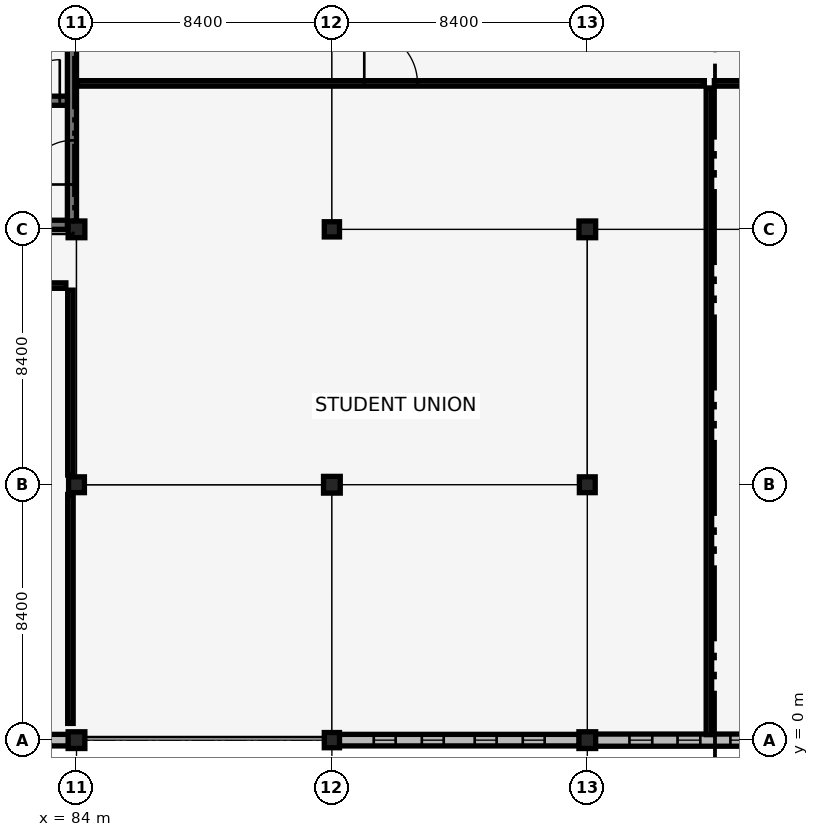
"""IFC4 building model, lengths in metres.
Left out: names, types, materials, properties, quantities, classifications, styles, units other than length and angle.
Written with IfcOpenShell. Run it as: python <this file> out.ifc"""

import sys

from ifc_helpers import new_model, si_unit, direction, frame, frame_2d, origin, origin_2d, place, context, subcontext, project, spatial, rectangle, extrude, element, fill, save


model = new_model("IFC4")
c1 = context("Model", 3, precision=1e-05, world=origin(), true_north=direction((0.0, 1.0)))
c2 = subcontext(c1, "Body", "Model", "MODEL_VIEW")
j1 = project(units=[si_unit("LENGTHUNIT", "METRE"), si_unit("PLANEANGLEUNIT", "RADIAN")], contexts=[c1])
p1 = place(None, origin())
s1 = spatial("IfcSite", under=j1, at=p1, CompositionType="ELEMENT")
p2 = place(p1, origin())
s2 = spatial("IfcBuilding", under=s1, at=p2, CompositionType="ELEMENT")
p3 = place(p2, frame((0.0, 0.0, 5.44)))
s3 = spatial("IfcBuildingStorey", under=s2, at=p3, CompositionType="ELEMENT", Elevation=5.44)
p4 = place(p3, frame((75.75, 16.95, 0.0), z_axis=(0.0, 0.0, 1.0), x_axis=(1.0, 0.0, 0.0)))
e1 = element("IfcWall", 1, at=p4, inside=s3, PredefinedType="SHEAR", context=c2, shape_type="SweptSolid", body=[
    extrude(rectangle(XDim=8.1, YDim=0.3, at=frame_2d((4.05, 0.0))), origin(), (0.0, 0.0, 1.0), 4.12),
])
p5 = place(p4, frame((0.485, 0.0, 0.0)))
e2 = element("IfcOpeningElement", 2, at=p5, cuts=e1, PredefinedType="OPENING", context=c2, shape_type="SweptSolid", body=[
    extrude(rectangle(XDim=1.0, YDim=2.15, at=frame_2d((0.5, 1.075))), frame((0.0, 0.16, 0.0), z_axis=(0.0, -1.0, 0.0), x_axis=(1.0, 0.0, 0.0)), (0.0, 0.0, 1.0), 0.32),
])
p6 = place(p3, frame((83.85, 16.95, 0.0), z_axis=(0.0, 0.0, 1.0), x_axis=(0.0, 1.0, 0.0)))
e3 = element("IfcWall", 3, at=p6, inside=s3, PredefinedType="SHEAR", context=c2, shape_type="SweptSolid", body=[
    extrude(rectangle(XDim=8.1, YDim=0.3, at=frame_2d((4.05, 0.0))), origin(), (0.0, 0.0, 1.0), 4.12),
])
p7 = place(p6, frame((1.325, 0.0, 0.0)))
e4 = element("IfcOpeningElement", 4, at=p7, cuts=e3, PredefinedType="OPENING", context=c2, shape_type="SweptSolid", body=[
    extrude(rectangle(XDim=1.45, YDim=2.15, at=frame_2d((0.725, 1.075))), frame((0.0, 0.16, 0.0), z_axis=(0.0, -1.0, 0.0), x_axis=(1.0, 0.0, 0.0)), (0.0, 0.0, 1.0), 0.32),
])
p8 = place(p3, frame((75.9, 21.03, 0.0), z_axis=(0.0, 0.0, 1.0), x_axis=(1.0, 0.0, 0.0)))
e5 = element("IfcWall", 5, at=p8, inside=s3, PredefinedType="SHEAR", context=c2, shape_type="SweptSolid", body=[
    extrude(rectangle(XDim=7.8, YDim=0.3, at=frame_2d((3.9, 0.0))), origin(), (0.0, 0.0, 1.0), 4.12),
])
p9 = place(p8, frame((6.2, 0.0, 0.0)))
e6 = element("IfcOpeningElement", 6, at=p9, cuts=e5, PredefinedType="OPENING", context=c2, shape_type="SweptSolid", body=[
    extrude(rectangle(XDim=1.35, YDim=2.15, at=frame_2d((0.675, 1.075))), frame((0.0, 0.16, 0.0), z_axis=(0.0, -1.0, 0.0), x_axis=(1.0, 0.0, 0.0)), (0.0, 0.0, 1.0), 0.32),
])
p10 = place(p3, frame((84.0, 0.0, 0.0), z_axis=(0.0, 0.0, 1.0), x_axis=(1.0, 0.0, 0.0)))
e7 = element("IfcColumn", 7, at=p10, inside=s3, PredefinedType="COLUMN", context=c2, shape_type="SweptSolid", body=[
    extrude(rectangle(XDim=0.55, YDim=0.55, at=origin_2d()), origin(), (0.0, 0.0, 1.0), 4.12),
])
p11 = place(p3, frame((84.0, 8.4, 0.0), z_axis=(0.0, 0.0, 1.0), x_axis=(1.0, 0.0, 0.0)))
e8 = element("IfcColumn", 8, at=p11, inside=s3, PredefinedType="COLUMN", context=c2, shape_type="SweptSolid", body=[
    extrude(rectangle(XDim=0.52, YDim=0.52, at=origin_2d()), origin(), (0.0, 0.0, 1.0), 4.12),
])
p12 = place(p3, frame((84.0, 16.8, 0.0), z_axis=(0.0, 0.0, 1.0), x_axis=(1.0, 0.0, 0.0)))
e9 = element("IfcColumn", 9, at=p12, inside=s3, PredefinedType="COLUMN", context=c2, shape_type="SweptSolid", body=[
    extrude(rectangle(XDim=0.55, YDim=0.55, at=origin_2d()), origin(), (0.0, 0.0, 1.0), 4.12),
])
p13 = place(p3, frame((92.4, 0.0, 0.0), z_axis=(0.0, 0.0, 1.0), x_axis=(1.0, 0.0, 0.0)))
e10 = element("IfcColumn", 10, at=p13, inside=s3, PredefinedType="COLUMN", context=c2, shape_type="SweptSolid", body=[
    extrude(rectangle(XDim=0.5, YDim=0.5, at=origin_2d()), origin(), (0.0, 0.0, 1.0), 4.12),
])
p14 = place(p3, frame((92.4, 8.4, 0.0), z_axis=(0.0, 0.0, 1.0), x_axis=(1.0, 0.0, 0.0)))
e11 = element("IfcColumn", 11, at=p14, inside=s3, PredefinedType="COLUMN", context=c2, shape_type="SweptSolid", body=[
    extrude(rectangle(XDim=0.55, YDim=0.55, at=origin_2d()), origin(), (0.0, 0.0, 1.0), 4.12),
])
p15 = place(p3, frame((92.4, 16.8, 0.0), z_axis=(0.0, 0.0, 1.0), x_axis=(1.0, 0.0, 0.0)))
e12 = element("IfcColumn", 12, at=p15, inside=s3, PredefinedType="COLUMN", context=c2, shape_type="SweptSolid", body=[
    extrude(rectangle(XDim=0.5, YDim=0.5, at=origin_2d()), origin(), (0.0, 0.0, 1.0), 4.12),
])
p16 = place(p3, frame((100.8, 0.0, 0.0), z_axis=(0.0, 0.0, 1.0), x_axis=(1.0, 0.0, 0.0)))
e13 = element("IfcColumn", 13, at=p16, inside=s3, PredefinedType="COLUMN", context=c2, shape_type="SweptSolid", body=[
    extrude(rectangle(XDim=0.55, YDim=0.55, at=origin_2d()), origin(), (0.0, 0.0, 1.0), 4.12),
])
p17 = place(p3, frame((100.8, 8.4, 0.0), z_axis=(0.0, 0.0, 1.0), x_axis=(1.0, 0.0, 0.0)))
e14 = element("IfcColumn", 14, at=p17, inside=s3, PredefinedType="COLUMN", context=c2, shape_type="SweptSolid", body=[
    extrude(rectangle(XDim=0.52, YDim=0.52, at=origin_2d()), origin(), (0.0, 0.0, 1.0), 4.12),
])
p18 = place(p3, frame((100.8, 16.8, 0.0), z_axis=(0.0, 0.0, 1.0), x_axis=(1.0, 0.0, 0.0)))
e15 = element("IfcColumn", 15, at=p18, inside=s3, PredefinedType="COLUMN", context=c2, shape_type="SweptSolid", body=[
    extrude(rectangle(XDim=0.55, YDim=0.55, at=origin_2d()), origin(), (0.0, 0.0, 1.0), 4.12),
])
p19 = place(p3, frame((75.835, 0.0, 0.0), z_axis=(0.0, 0.0, 1.0), x_axis=(1.0, 0.0, 0.0)))
e16 = element("IfcWall", 16, at=p19, inside=s3, PredefinedType="SOLIDWALL", context=c2, shape_type="SweptSolid", body=[
    extrude(rectangle(XDim=7.905, YDim=0.38, at=frame_2d((3.953, 0.0))), origin(), (0.0, 0.0, 1.0), 3.38),
])
p20 = place(p19, frame((1.162, 0.0, 0.7)))
e17 = element("IfcOpeningElement", 17, at=p20, cuts=e16, PredefinedType="OPENING", context=c2, shape_type="SweptSolid", body=[
    extrude(rectangle(XDim=0.68, YDim=2.3, at=frame_2d((0.34, 1.15))), frame((0.0, 0.2, 0.0), z_axis=(0.0, -1.0, 0.0), x_axis=(1.0, 0.0, 0.0)), (0.0, 0.0, 1.0), 0.4),
])
p21 = place(p19, frame((2.743, 0.0, 0.7)))
e18 = element("IfcOpeningElement", 18, at=p21, cuts=e16, PredefinedType="OPENING", context=c2, shape_type="SweptSolid", body=[
    extrude(rectangle(XDim=0.68, YDim=2.3, at=frame_2d((0.34, 1.15))), frame((0.0, 0.2, 0.0), z_axis=(0.0, -1.0, 0.0), x_axis=(1.0, 0.0, 0.0)), (0.0, 0.0, 1.0), 0.4),
])
p22 = place(p19, frame((4.482, 0.0, 0.7)))
e19 = element("IfcOpeningElement", 19, at=p22, cuts=e16, PredefinedType="OPENING", context=c2, shape_type="SweptSolid", body=[
    extrude(rectangle(XDim=0.68, YDim=2.3, at=frame_2d((0.34, 1.15))), frame((0.0, 0.2, 0.0), z_axis=(0.0, -1.0, 0.0), x_axis=(1.0, 0.0, 0.0)), (0.0, 0.0, 1.0), 0.4),
])
p23 = place(p19, frame((6.063, 0.0, 0.7)))
e20 = element("IfcOpeningElement", 20, at=p23, cuts=e16, PredefinedType="OPENING", context=c2, shape_type="SweptSolid", body=[
    extrude(rectangle(XDim=0.68, YDim=2.3, at=frame_2d((0.34, 1.15))), frame((0.0, 0.2, 0.0), z_axis=(0.0, -1.0, 0.0), x_axis=(1.0, 0.0, 0.0)), (0.0, 0.0, 1.0), 0.4),
])
p24 = place(p3, frame((92.635, 0.0, 0.0), z_axis=(0.0, 0.0, 1.0), x_axis=(1.0, 0.0, 0.0)))
e21 = element("IfcWall", 21, at=p24, inside=s3, PredefinedType="SOLIDWALL", context=c2, shape_type="SweptSolid", body=[
    extrude(rectangle(XDim=7.905, YDim=0.38, at=frame_2d((3.953, 0.0))), origin(), (0.0, 0.0, 1.0), 3.38),
])
p25 = place(p24, frame((1.142, 0.0, 0.7)))
e22 = element("IfcOpeningElement", 22, at=p25, cuts=e21, PredefinedType="OPENING", context=c2, shape_type="SweptSolid", body=[
    extrude(rectangle(XDim=0.72, YDim=2.4, at=frame_2d((0.36, 1.2))), frame((0.0, 0.2, 0.0), z_axis=(0.0, -1.0, 0.0), x_axis=(1.0, 0.0, 0.0)), (0.0, 0.0, 1.0), 0.4),
])
p26 = place(p24, frame((2.723, 0.0, 0.7)))
e23 = element("IfcOpeningElement", 23, at=p26, cuts=e21, PredefinedType="OPENING", context=c2, shape_type="SweptSolid", body=[
    extrude(rectangle(XDim=0.72, YDim=2.4, at=frame_2d((0.36, 1.2))), frame((0.0, 0.2, 0.0), z_axis=(0.0, -1.0, 0.0), x_axis=(1.0, 0.0, 0.0)), (0.0, 0.0, 1.0), 0.4),
])
p27 = place(p24, frame((4.462, 0.0, 0.7)))
e24 = element("IfcOpeningElement", 24, at=p27, cuts=e21, PredefinedType="OPENING", context=c2, shape_type="SweptSolid", body=[
    extrude(rectangle(XDim=0.72, YDim=2.4, at=frame_2d((0.36, 1.2))), frame((0.0, 0.2, 0.0), z_axis=(0.0, -1.0, 0.0), x_axis=(1.0, 0.0, 0.0)), (0.0, 0.0, 1.0), 0.4),
])
p28 = place(p24, frame((6.043, 0.0, 0.7)))
e25 = element("IfcOpeningElement", 25, at=p28, cuts=e21, PredefinedType="OPENING", context=c2, shape_type="SweptSolid", body=[
    extrude(rectangle(XDim=0.72, YDim=2.4, at=frame_2d((0.36, 1.2))), frame((0.0, 0.2, 0.0), z_axis=(0.0, -1.0, 0.0), x_axis=(1.0, 0.0, 0.0)), (0.0, 0.0, 1.0), 0.4),
])
p29 = place(p3, frame((101.06, 0.0, 0.0), z_axis=(0.0, 0.0, 1.0), x_axis=(1.0, 0.0, 0.0)))
e26 = element("IfcWall", 26, at=p29, inside=s3, PredefinedType="SOLIDWALL", context=c2, shape_type="SweptSolid", body=[
    extrude(rectangle(XDim=7.905, YDim=0.4, at=frame_2d((3.953, 0.0))), origin(), (0.0, 0.0, 1.0), 3.38),
])
p30 = place(p29, frame((1.127, 0.0, 0.7)))
e27 = element("IfcOpeningElement", 27, at=p30, cuts=e26, PredefinedType="OPENING", context=c2, shape_type="SweptSolid", body=[
    extrude(rectangle(XDim=0.75, YDim=2.1, at=frame_2d((0.375, 1.05))), frame((0.0, 0.21, 0.0), z_axis=(0.0, -1.0, 0.0), x_axis=(1.0, 0.0, 0.0)), (0.0, 0.0, 1.0), 0.42),
])
p31 = place(p29, frame((2.708, 0.0, 0.7)))
e28 = element("IfcOpeningElement", 28, at=p31, cuts=e26, PredefinedType="OPENING", context=c2, shape_type="SweptSolid", body=[
    extrude(rectangle(XDim=0.75, YDim=2.1, at=frame_2d((0.375, 1.05))), frame((0.0, 0.21, 0.0), z_axis=(0.0, -1.0, 0.0), x_axis=(1.0, 0.0, 0.0)), (0.0, 0.0, 1.0), 0.42),
])
p32 = place(p29, frame((4.447, 0.0, 0.7)))
e29 = element("IfcOpeningElement", 29, at=p32, cuts=e26, PredefinedType="OPENING", context=c2, shape_type="SweptSolid", body=[
    extrude(rectangle(XDim=0.75, YDim=2.1, at=frame_2d((0.375, 1.05))), frame((0.0, 0.21, 0.0), z_axis=(0.0, -1.0, 0.0), x_axis=(1.0, 0.0, 0.0)), (0.0, 0.0, 1.0), 0.42),
])
p33 = place(p29, frame((6.028, 0.0, 0.7)))
e30 = element("IfcOpeningElement", 30, at=p33, cuts=e26, PredefinedType="OPENING", context=c2, shape_type="SweptSolid", body=[
    extrude(rectangle(XDim=0.75, YDim=2.1, at=frame_2d((0.375, 1.05))), frame((0.0, 0.21, 0.0), z_axis=(0.0, -1.0, 0.0), x_axis=(1.0, 0.0, 0.0)), (0.0, 0.0, 1.0), 0.42),
])
p34 = place(p3, frame((76.15, 14.95, 0.0), z_axis=(0.0, 0.0, 1.0), x_axis=(1.0, 0.0, 0.0)))
e31 = element("IfcWall", 31, at=p34, inside=s3, PredefinedType="PARTITIONING", context=c2, shape_type="SweptSolid", body=[
    extrude(rectangle(XDim=7.5, YDim=0.18, at=frame_2d((3.75, 0.0))), origin(), (0.0, 0.0, 1.0), 4.12),
])
p35 = place(p34, frame((2.875, 0.0, 0.0)))
e32 = element("IfcOpeningElement", 32, at=p35, cuts=e31, PredefinedType="OPENING", context=c2, shape_type="SweptSolid", body=[
    extrude(rectangle(XDim=1.75, YDim=2.3, at=frame_2d((0.875, 1.15))), frame((0.0, 0.1, 0.0), z_axis=(0.0, -1.0, 0.0), x_axis=(1.0, 0.0, 0.0)), (0.0, 0.0, 1.0), 0.2),
])
p36 = place(p3, frame((83.8, 0.55, 0.0), z_axis=(0.0, 0.0, 1.0), x_axis=(0.0, 1.0, 0.0)))
e33 = element("IfcWall", 33, at=p36, inside=s3, PredefinedType="PARTITIONING", context=c2, shape_type="SweptSolid", body=[
    extrude(rectangle(XDim=7.53, YDim=0.18, at=frame_2d((3.765, 0.0))), origin(), (0.0, 0.0, 1.0), 3.47),
])
p37 = place(p3, frame((83.8, 8.72, 0.0), z_axis=(0.0, 0.0, 1.0), x_axis=(0.0, 1.0, 0.0)))
e34 = element("IfcWall", 34, at=p37, inside=s3, PredefinedType="PARTITIONING", context=c2, shape_type="SweptSolid", body=[
    extrude(rectangle(XDim=6.08, YDim=0.18, at=frame_2d((3.04, 0.0))), origin(), (0.0, 0.0, 1.0), 3.47),
])
p38 = place(p3, frame((84.03, 21.6, 0.0), z_axis=(0.0, 0.0, 1.0), x_axis=(1.0, 0.0, 0.0)))
e35 = element("IfcWall", 35, at=p38, inside=s3, PredefinedType="PARTITIONING", context=c2, shape_type="SweptSolid", body=[
    extrude(rectangle(XDim=20.62, YDim=0.18, at=frame_2d((10.31, 0.0))), origin(), (0.0, 0.0, 1.0), 3.47),
])
p39 = place(p38, frame((9.435, 0.0, 0.0)))
e36 = element("IfcOpeningElement", 36, at=p39, cuts=e35, PredefinedType="OPENING", context=c2, shape_type="SweptSolid", body=[
    extrude(rectangle(XDim=1.75, YDim=2.3, at=frame_2d((0.875, 1.15))), frame((0.0, 0.1, 0.0), z_axis=(0.0, -1.0, 0.0), x_axis=(1.0, 0.0, 0.0)), (0.0, 0.0, 1.0), 0.2),
])
p40 = place(p3, frame((104.8, 0.18, 0.0), z_axis=(0.0, 0.0, 1.0), x_axis=(0.0, 1.0, 0.0)))
e37 = element("IfcWall", 37, at=p40, inside=s3, PredefinedType="PARTITIONING", context=c2, shape_type="SweptSolid", body=[
    extrude(rectangle(XDim=21.27, YDim=0.18, at=frame_2d((10.635, 0.0))), origin(), (0.0, 0.0, 1.0), 3.34),
])
p41 = place(p3, frame((104.98, 21.6, 0.0), z_axis=(0.0, 0.0, 1.0), x_axis=(1.0, 0.0, 0.0)))
e38 = element("IfcWall", 38, at=p41, inside=s3, PredefinedType="PARTITIONING", context=c2, shape_type="SweptSolid", body=[
    extrude(rectangle(XDim=20.67, YDim=0.18, at=frame_2d((10.335, 0.0))), origin(), (0.0, 0.0, 1.0), 3.47),
])
p42 = place(p41, frame((9.46, 0.0, 0.0)))
e39 = element("IfcOpeningElement", 39, at=p42, cuts=e38, PredefinedType="OPENING", context=c2, shape_type="SweptSolid", body=[
    extrude(rectangle(XDim=1.75, YDim=2.3, at=frame_2d((0.875, 1.15))), frame((0.0, 0.1, 0.0), z_axis=(0.0, -1.0, 0.0), x_axis=(1.0, 0.0, 0.0)), (0.0, 0.0, 1.0), 0.2),
])
p43 = place(p25, origin())
e40 = element("IfcWindow", 40, at=p43, inside=s3, PartitioningType="DOUBLE_PANEL_VERTICAL", PredefinedType="WINDOW", context=c2, shape_type="SweptSolid", body=[
    extrude(rectangle(XDim=0.72, YDim=2.4, at=frame_2d((0.36, 1.2))), frame((0.0, 0.03, 0.0), z_axis=(0.0, -1.0, 0.0), x_axis=(1.0, 0.0, 0.0)), (0.0, 0.0, 1.0), 0.06),
])
fill(e22, e40)
p44 = place(p26, origin())
e41 = element("IfcWindow", 41, at=p44, inside=s3, PartitioningType="DOUBLE_PANEL_VERTICAL", PredefinedType="WINDOW", context=c2, shape_type="SweptSolid", body=[
    extrude(rectangle(XDim=0.72, YDim=2.4, at=frame_2d((0.36, 1.2))), frame((0.0, 0.03, 0.0), z_axis=(0.0, -1.0, 0.0), x_axis=(1.0, 0.0, 0.0)), (0.0, 0.0, 1.0), 0.06),
])
fill(e23, e41)
p45 = place(p27, origin())
e42 = element("IfcWindow", 42, at=p45, inside=s3, PartitioningType="DOUBLE_PANEL_VERTICAL", PredefinedType="WINDOW", context=c2, shape_type="SweptSolid", body=[
    extrude(rectangle(XDim=0.72, YDim=2.4, at=frame_2d((0.36, 1.2))), frame((0.0, 0.03, 0.0), z_axis=(0.0, -1.0, 0.0), x_axis=(1.0, 0.0, 0.0)), (0.0, 0.0, 1.0), 0.06),
])
fill(e24, e42)
p46 = place(p28, origin())
e43 = element("IfcWindow", 43, at=p46, inside=s3, PartitioningType="DOUBLE_PANEL_VERTICAL", PredefinedType="WINDOW", context=c2, shape_type="SweptSolid", body=[
    extrude(rectangle(XDim=0.72, YDim=2.4, at=frame_2d((0.36, 1.2))), frame((0.0, 0.03, 0.0), z_axis=(0.0, -1.0, 0.0), x_axis=(1.0, 0.0, 0.0)), (0.0, 0.0, 1.0), 0.06),
])
fill(e25, e43)
p47 = place(p30, origin())
e44 = element("IfcWindow", 44, at=p47, inside=s3, PartitioningType="DOUBLE_PANEL_VERTICAL", PredefinedType="WINDOW", context=c2, shape_type="SweptSolid", body=[
    extrude(rectangle(XDim=0.75, YDim=2.1, at=frame_2d((0.375, 1.05))), frame((0.0, 0.03, 0.0), z_axis=(0.0, -1.0, 0.0), x_axis=(1.0, 0.0, 0.0)), (0.0, 0.0, 1.0), 0.06),
])
fill(e27, e44)
p48 = place(p31, origin())
e45 = element("IfcWindow", 45, at=p48, inside=s3, PartitioningType="DOUBLE_PANEL_VERTICAL", PredefinedType="WINDOW", context=c2, shape_type="SweptSolid", body=[
    extrude(rectangle(XDim=0.75, YDim=2.1, at=frame_2d((0.375, 1.05))), frame((0.0, 0.03, 0.0), z_axis=(0.0, -1.0, 0.0), x_axis=(1.0, 0.0, 0.0)), (0.0, 0.0, 1.0), 0.06),
])
fill(e28, e45)
p49 = place(p32, origin())
e46 = element("IfcWindow", 46, at=p49, inside=s3, PartitioningType="DOUBLE_PANEL_VERTICAL", PredefinedType="WINDOW", context=c2, shape_type="SweptSolid", body=[
    extrude(rectangle(XDim=0.75, YDim=2.1, at=frame_2d((0.375, 1.05))), frame((0.0, 0.03, 0.0), z_axis=(0.0, -1.0, 0.0), x_axis=(1.0, 0.0, 0.0)), (0.0, 0.0, 1.0), 0.06),
])
fill(e29, e46)
p50 = place(p9, origin())
e47 = element("IfcDoor", 47, at=p50, inside=s3, OperationType="SINGLE_SWING_RIGHT", PredefinedType="DOOR", context=c2, shape_type="SweptSolid", body=[
    extrude(rectangle(XDim=1.35, YDim=2.15, at=frame_2d((0.675, 1.075))), frame((0.0, 0.025, 0.0), z_axis=(0.0, -1.0, 0.0), x_axis=(1.0, 0.0, 0.0)), (0.0, 0.0, 1.0), 0.05),
])
fill(e6, e47)
p51 = place(p7, origin())
e48 = element("IfcDoor", 48, at=p51, inside=s3, OperationType="DOUBLE_DOOR_SINGLE_SWING", PredefinedType="DOOR", context=c2, shape_type="SweptSolid", body=[
    extrude(rectangle(XDim=1.45, YDim=2.15, at=frame_2d((0.725, 1.075))), frame((0.0, 0.025, 0.0), z_axis=(0.0, -1.0, 0.0), x_axis=(1.0, 0.0, 0.0)), (0.0, 0.0, 1.0), 0.05),
])
fill(e4, e48)
p52 = place(p39, origin())
e49 = element("IfcDoor", 49, at=p52, inside=s3, OperationType="DOUBLE_DOOR_SINGLE_SWING", PredefinedType="DOOR", context=c2, shape_type="SweptSolid", body=[
    extrude(rectangle(XDim=1.75, YDim=2.3, at=frame_2d((0.875, 1.15))), frame((0.0, 0.025, 0.0), z_axis=(0.0, -1.0, 0.0), x_axis=(1.0, 0.0, 0.0)), (0.0, 0.0, 1.0), 0.05),
])
fill(e36, e49)
save(model, sys.argv[1])
